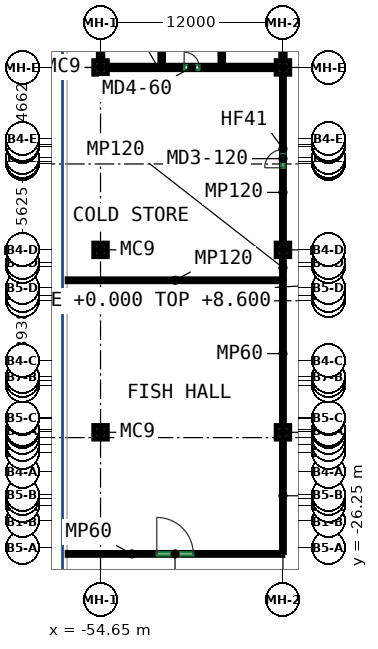
"""IFC4 building model, lengths in metres.
Left out: names, types, materials, properties, quantities, classifications, styles, units other than length and angle.
Written with IfcOpenShell. Run it as: python <this file> out.ifc"""

import sys

from ifc_helpers import new_model, si_unit, direction, frame, frame_2d, origin, origin_2d, place, context, subcontext, project, spatial, rectangle, extrude, source, transform, mapped, element, fill, save


model = new_model("IFC4")
c1 = context("Model", 3, precision=1e-05, world=origin(), true_north=direction((0.0, 1.0)))
c2 = subcontext(c1, "Body", "Model", "MODEL_VIEW")
j1 = project(units=[si_unit("LENGTHUNIT", "METRE"), si_unit("PLANEANGLEUNIT", "RADIAN")], contexts=[c1])
p1 = place(None, origin())
s1 = spatial("IfcSite", under=j1, at=p1, CompositionType="ELEMENT")
p2 = place(p1, origin())
s2 = spatial("IfcBuilding", under=s1, at=p2, CompositionType="ELEMENT")
p3 = place(p2, origin())
s3 = spatial("IfcBuildingStorey", under=s2, at=p3, CompositionType="ELEMENT", Elevation=0.0)
m1 = source(origin(), c2, "Body", "SweptSolid", [
    extrude(rectangle(XDim=0.9, YDim=0.9, at=origin_2d()), origin(), (0.0, 0.0, 1.0), 8.6),
])
for number, where, z_axis, x_axis in (
    (1, (-54.65, -18.65, 0.0), (0.0, 0.0, 1.0), (1.0, 0.0, 0.0)),
    (2, (-54.65, -6.65, 0.0), (0.0, 0.0, 1.0), (1.0, 0.0, 0.0)),
    (3, (-54.65, 5.35, 0.0), (0.0, 0.0, 1.0), (1.0, 0.0, 0.0)),
    (4, (-42.65, -18.65, 0.0), (0.0, 0.0, 1.0), (1.0, 0.0, 0.0)),
    (5, (-42.65, -6.65, 0.0), (0.0, 0.0, 1.0), (1.0, 0.0, 0.0)),
    (6, (-42.65, 5.35, 0.0), (0.0, 0.0, 1.0), (1.0, 0.0, 0.0)),
):
    element("IfcColumn", number, at=place(p3, frame(where, z_axis=z_axis, x_axis=x_axis)), inside=s3, PredefinedType="COLUMN", context=c2, shape_type="MappedRepresentation", body=[
        mapped(m1, transform((0.0, 0.0, 0.0))),
    ])
m2 = source(origin(), c2, "Body", "SweptSolid", [
    extrude(rectangle(XDim=11.1, YDim=0.3, at=frame_2d((5.55, 0.0))), origin(), (0.0, 0.0, 1.0), 7.7),
])
p4 = place(p3, frame((-54.2, 5.35, 0.0), z_axis=(0.0, 0.0, 1.0), x_axis=(1.0, 0.0, 0.0)))
e7 = element("IfcWall", 7, at=p4, inside=s3, PredefinedType="SHEAR", context=c2, shape_type="MappedRepresentation", body=[
    mapped(m2, transform((0.0, 0.0, 0.0))),
])
p5 = place(p4, frame((5.05, 0.0, 0.0)))
e8 = element("IfcOpeningElement", 8, at=p5, cuts=e7, PredefinedType="OPENING", context=c2, shape_type="SweptSolid", body=[
    extrude(rectangle(XDim=1.0, YDim=2.1, at=frame_2d((0.5, 1.05))), frame((0.0, 0.16, 0.0), z_axis=(0.0, -1.0, 0.0), x_axis=(1.0, 0.0, 0.0)), (0.0, 0.0, 1.0), 0.32),
])
for number, where, z_axis, x_axis in (
    (9, (-54.65, 5.8, 0.0), (0.0, 0.0, 1.0), (0.0, 1.0, 0.0)),
    (10, (-42.65, 5.8, 0.0), (0.0, 0.0, 1.0), (0.0, 1.0, 0.0)),
):
    element("IfcWall", number, at=place(p3, frame(where, z_axis=z_axis, x_axis=x_axis)), inside=s3, PredefinedType="SHEAR", context=c2, shape_type="MappedRepresentation", body=[
        mapped(m2, transform((0.0, 0.0, 0.0))),
    ])
m3 = source(origin(), c2, "Body", "SweptSolid", [
    extrude(rectangle(XDim=9.85, YDim=0.25, at=frame_2d((4.925, 0.0))), origin(), (0.0, 0.0, 1.0), 8.6),
])
for number, where, z_axis, x_axis in (
    (11, (-50.625, 5.5, 0.0), (0.0, 0.0, 1.0), (0.0, 1.0, 0.0)),
    (12, (-46.675, 5.5, 0.0), (0.0, 0.0, 1.0), (0.0, 1.0, 0.0)),
):
    element("IfcWall", number, at=place(p3, frame(where, z_axis=z_axis, x_axis=x_axis)), inside=s3, PredefinedType="SHEAR", context=c2, shape_type="MappedRepresentation", body=[
        mapped(m3, transform((0.0, 0.0, 0.0))),
    ])
m4 = source(origin(), c2, "Body", "SweptSolid", [
    extrude(rectangle(XDim=100.7, YDim=0.3, at=frame_2d((50.35, 0.0))), origin(), (0.0, 0.0, 1.0), 8.6),
])
p6 = place(p3, frame((-57.0, -43.55, 0.0), z_axis=(0.0, 0.0, 1.0), x_axis=(0.0, 1.0, 0.0)))
e13 = element("IfcWall", 13, at=p6, inside=s3, PredefinedType="SOLIDWALL", context=c2, shape_type="MappedRepresentation", body=[
    mapped(m4, transform((0.0, 0.0, 0.0))),
])
p7 = place(p6, frame((9.15, 0.0, 0.0)))
e14 = element("IfcOpeningElement", 14, at=p7, cuts=e13, PredefinedType="OPENING", context=c2, shape_type="SweptSolid", body=[
    extrude(rectangle(XDim=1.5, YDim=2.4, at=frame_2d((0.75, 1.2))), frame((0.0, 0.16, 0.0), z_axis=(0.0, -1.0, 0.0), x_axis=(1.0, 0.0, 0.0)), (0.0, 0.0, 1.0), 0.32),
])
p8 = place(p6, frame((29.25, 0.0, 0.0)))
e15 = element("IfcOpeningElement", 15, at=p8, cuts=e13, PredefinedType="OPENING", context=c2, shape_type="SweptSolid", body=[
    extrude(rectangle(XDim=1.5, YDim=2.4, at=frame_2d((0.75, 1.2))), frame((0.0, 0.16, 0.0), z_axis=(0.0, -1.0, 0.0), x_axis=(1.0, 0.0, 0.0)), (0.0, 0.0, 1.0), 0.32),
])
p9 = place(p6, frame((49.45, 0.0, 0.0)))
e16 = element("IfcOpeningElement", 16, at=p9, cuts=e13, PredefinedType="OPENING", context=c2, shape_type="SweptSolid", body=[
    extrude(rectangle(XDim=1.5, YDim=2.4, at=frame_2d((0.75, 1.2))), frame((0.0, 0.16, 0.0), z_axis=(0.0, -1.0, 0.0), x_axis=(1.0, 0.0, 0.0)), (0.0, 0.0, 1.0), 0.32),
])
p10 = place(p6, frame((69.65, 0.0, 0.0)))
e17 = element("IfcOpeningElement", 17, at=p10, cuts=e13, PredefinedType="OPENING", context=c2, shape_type="SweptSolid", body=[
    extrude(rectangle(XDim=1.5, YDim=2.4, at=frame_2d((0.75, 1.2))), frame((0.0, 0.16, 0.0), z_axis=(0.0, -1.0, 0.0), x_axis=(1.0, 0.0, 0.0)), (0.0, 0.0, 1.0), 0.32),
])
p11 = place(p6, frame((89.85, 0.0, 0.0)))
e18 = element("IfcOpeningElement", 18, at=p11, cuts=e13, PredefinedType="OPENING", context=c2, shape_type="SweptSolid", body=[
    extrude(rectangle(XDim=1.5, YDim=2.4, at=frame_2d((0.75, 1.2))), frame((0.0, 0.16, 0.0), z_axis=(0.0, -1.0, 0.0), x_axis=(1.0, 0.0, 0.0)), (0.0, 0.0, 1.0), 0.32),
])
p12 = place(p6, frame((3.15, 0.0, 0.6)))
e19 = element("IfcOpeningElement", 19, at=p12, cuts=e13, PredefinedType="OPENING", context=c2, shape_type="SweptSolid", body=[
    extrude(rectangle(XDim=2.4, YDim=3.0, at=frame_2d((1.2, 1.5))), frame((0.0, 0.16, 0.0), z_axis=(0.0, -1.0, 0.0), x_axis=(1.0, 0.0, 0.0)), (0.0, 0.0, 1.0), 0.32),
])
p13 = place(p6, frame((3.15, 0.0, 5.0)))
e20 = element("IfcOpeningElement", 20, at=p13, cuts=e13, PredefinedType="OPENING", context=c2, shape_type="SweptSolid", body=[
    extrude(rectangle(XDim=2.4, YDim=2.0, at=frame_2d((1.2, 1.0))), frame((0.0, 0.16, 0.0), z_axis=(0.0, -1.0, 0.0), x_axis=(1.0, 0.0, 0.0)), (0.0, 0.0, 1.0), 0.32),
])
p14 = place(p6, frame((19.15, 0.0, 0.6)))
e21 = element("IfcOpeningElement", 21, at=p14, cuts=e13, PredefinedType="OPENING", context=c2, shape_type="SweptSolid", body=[
    extrude(rectangle(XDim=2.4, YDim=3.0, at=frame_2d((1.2, 1.5))), frame((0.0, 0.16, 0.0), z_axis=(0.0, -1.0, 0.0), x_axis=(1.0, 0.0, 0.0)), (0.0, 0.0, 1.0), 0.32),
])
p15 = place(p6, frame((19.15, 0.0, 5.0)))
e22 = element("IfcOpeningElement", 22, at=p15, cuts=e13, PredefinedType="OPENING", context=c2, shape_type="SweptSolid", body=[
    extrude(rectangle(XDim=2.4, YDim=2.0, at=frame_2d((1.2, 1.0))), frame((0.0, 0.16, 0.0), z_axis=(0.0, -1.0, 0.0), x_axis=(1.0, 0.0, 0.0)), (0.0, 0.0, 1.0), 0.32),
])
p16 = place(p6, frame((23.15, 0.0, 0.6)))
e23 = element("IfcOpeningElement", 23, at=p16, cuts=e13, PredefinedType="OPENING", context=c2, shape_type="SweptSolid", body=[
    extrude(rectangle(XDim=2.4, YDim=3.0, at=frame_2d((1.2, 1.5))), frame((0.0, 0.16, 0.0), z_axis=(0.0, -1.0, 0.0), x_axis=(1.0, 0.0, 0.0)), (0.0, 0.0, 1.0), 0.32),
])
p17 = place(p6, frame((23.15, 0.0, 5.0)))
e24 = element("IfcOpeningElement", 24, at=p17, cuts=e13, PredefinedType="OPENING", context=c2, shape_type="SweptSolid", body=[
    extrude(rectangle(XDim=2.4, YDim=2.0, at=frame_2d((1.2, 1.0))), frame((0.0, 0.16, 0.0), z_axis=(0.0, -1.0, 0.0), x_axis=(1.0, 0.0, 0.0)), (0.0, 0.0, 1.0), 0.32),
])
p18 = place(p6, frame((39.15, 0.0, 0.6)))
e25 = element("IfcOpeningElement", 25, at=p18, cuts=e13, PredefinedType="OPENING", context=c2, shape_type="SweptSolid", body=[
    extrude(rectangle(XDim=2.4, YDim=3.0, at=frame_2d((1.2, 1.5))), frame((0.0, 0.16, 0.0), z_axis=(0.0, -1.0, 0.0), x_axis=(1.0, 0.0, 0.0)), (0.0, 0.0, 1.0), 0.32),
])
p19 = place(p6, frame((39.15, 0.0, 5.0)))
e26 = element("IfcOpeningElement", 26, at=p19, cuts=e13, PredefinedType="OPENING", context=c2, shape_type="SweptSolid", body=[
    extrude(rectangle(XDim=2.4, YDim=2.0, at=frame_2d((1.2, 1.0))), frame((0.0, 0.16, 0.0), z_axis=(0.0, -1.0, 0.0), x_axis=(1.0, 0.0, 0.0)), (0.0, 0.0, 1.0), 0.32),
])
p20 = place(p6, frame((43.15, 0.0, 0.6)))
e27 = element("IfcOpeningElement", 27, at=p20, cuts=e13, PredefinedType="OPENING", context=c2, shape_type="SweptSolid", body=[
    extrude(rectangle(XDim=2.4, YDim=3.0, at=frame_2d((1.2, 1.5))), frame((0.0, 0.16, 0.0), z_axis=(0.0, -1.0, 0.0), x_axis=(1.0, 0.0, 0.0)), (0.0, 0.0, 1.0), 0.32),
])
p21 = place(p6, frame((43.15, 0.0, 5.0)))
e28 = element("IfcOpeningElement", 28, at=p21, cuts=e13, PredefinedType="OPENING", context=c2, shape_type="SweptSolid", body=[
    extrude(rectangle(XDim=2.4, YDim=2.0, at=frame_2d((1.2, 1.0))), frame((0.0, 0.16, 0.0), z_axis=(0.0, -1.0, 0.0), x_axis=(1.0, 0.0, 0.0)), (0.0, 0.0, 1.0), 0.32),
])
p22 = place(p6, frame((55.15, 0.0, 0.6)))
e29 = element("IfcOpeningElement", 29, at=p22, cuts=e13, PredefinedType="OPENING", context=c2, shape_type="SweptSolid", body=[
    extrude(rectangle(XDim=2.4, YDim=3.0, at=frame_2d((1.2, 1.5))), frame((0.0, 0.16, 0.0), z_axis=(0.0, -1.0, 0.0), x_axis=(1.0, 0.0, 0.0)), (0.0, 0.0, 1.0), 0.32),
])
p23 = place(p6, frame((55.15, 0.0, 5.0)))
e30 = element("IfcOpeningElement", 30, at=p23, cuts=e13, PredefinedType="OPENING", context=c2, shape_type="SweptSolid", body=[
    extrude(rectangle(XDim=2.4, YDim=2.0, at=frame_2d((1.2, 1.0))), frame((0.0, 0.16, 0.0), z_axis=(0.0, -1.0, 0.0), x_axis=(1.0, 0.0, 0.0)), (0.0, 0.0, 1.0), 0.32),
])
p24 = place(p6, frame((59.15, 0.0, 0.6)))
e31 = element("IfcOpeningElement", 31, at=p24, cuts=e13, PredefinedType="OPENING", context=c2, shape_type="SweptSolid", body=[
    extrude(rectangle(XDim=2.4, YDim=3.0, at=frame_2d((1.2, 1.5))), frame((0.0, 0.16, 0.0), z_axis=(0.0, -1.0, 0.0), x_axis=(1.0, 0.0, 0.0)), (0.0, 0.0, 1.0), 0.32),
])
p25 = place(p6, frame((59.15, 0.0, 5.0)))
e32 = element("IfcOpeningElement", 32, at=p25, cuts=e13, PredefinedType="OPENING", context=c2, shape_type="SweptSolid", body=[
    extrude(rectangle(XDim=2.4, YDim=2.0, at=frame_2d((1.2, 1.0))), frame((0.0, 0.16, 0.0), z_axis=(0.0, -1.0, 0.0), x_axis=(1.0, 0.0, 0.0)), (0.0, 0.0, 1.0), 0.32),
])
p26 = place(p6, frame((63.15, 0.0, 0.6)))
e33 = element("IfcOpeningElement", 33, at=p26, cuts=e13, PredefinedType="OPENING", context=c2, shape_type="SweptSolid", body=[
    extrude(rectangle(XDim=2.4, YDim=3.0, at=frame_2d((1.2, 1.5))), frame((0.0, 0.16, 0.0), z_axis=(0.0, -1.0, 0.0), x_axis=(1.0, 0.0, 0.0)), (0.0, 0.0, 1.0), 0.32),
])
p27 = place(p6, frame((63.15, 0.0, 5.0)))
e34 = element("IfcOpeningElement", 34, at=p27, cuts=e13, PredefinedType="OPENING", context=c2, shape_type="SweptSolid", body=[
    extrude(rectangle(XDim=2.4, YDim=2.0, at=frame_2d((1.2, 1.0))), frame((0.0, 0.16, 0.0), z_axis=(0.0, -1.0, 0.0), x_axis=(1.0, 0.0, 0.0)), (0.0, 0.0, 1.0), 0.32),
])
p28 = place(p6, frame((75.15, 0.0, 0.6)))
e35 = element("IfcOpeningElement", 35, at=p28, cuts=e13, PredefinedType="OPENING", context=c2, shape_type="SweptSolid", body=[
    extrude(rectangle(XDim=2.4, YDim=3.0, at=frame_2d((1.2, 1.5))), frame((0.0, 0.16, 0.0), z_axis=(0.0, -1.0, 0.0), x_axis=(1.0, 0.0, 0.0)), (0.0, 0.0, 1.0), 0.32),
])
p29 = place(p6, frame((75.15, 0.0, 5.0)))
e36 = element("IfcOpeningElement", 36, at=p29, cuts=e13, PredefinedType="OPENING", context=c2, shape_type="SweptSolid", body=[
    extrude(rectangle(XDim=2.4, YDim=2.0, at=frame_2d((1.2, 1.0))), frame((0.0, 0.16, 0.0), z_axis=(0.0, -1.0, 0.0), x_axis=(1.0, 0.0, 0.0)), (0.0, 0.0, 1.0), 0.32),
])
p30 = place(p6, frame((79.15, 0.0, 0.6)))
e37 = element("IfcOpeningElement", 37, at=p30, cuts=e13, PredefinedType="OPENING", context=c2, shape_type="SweptSolid", body=[
    extrude(rectangle(XDim=2.4, YDim=3.0, at=frame_2d((1.2, 1.5))), frame((0.0, 0.16, 0.0), z_axis=(0.0, -1.0, 0.0), x_axis=(1.0, 0.0, 0.0)), (0.0, 0.0, 1.0), 0.32),
])
p31 = place(p6, frame((79.15, 0.0, 5.0)))
e38 = element("IfcOpeningElement", 38, at=p31, cuts=e13, PredefinedType="OPENING", context=c2, shape_type="SweptSolid", body=[
    extrude(rectangle(XDim=2.4, YDim=2.0, at=frame_2d((1.2, 1.0))), frame((0.0, 0.16, 0.0), z_axis=(0.0, -1.0, 0.0), x_axis=(1.0, 0.0, 0.0)), (0.0, 0.0, 1.0), 0.32),
])
p32 = place(p6, frame((83.15, 0.0, 0.6)))
e39 = element("IfcOpeningElement", 39, at=p32, cuts=e13, PredefinedType="OPENING", context=c2, shape_type="SweptSolid", body=[
    extrude(rectangle(XDim=2.4, YDim=3.0, at=frame_2d((1.2, 1.5))), frame((0.0, 0.16, 0.0), z_axis=(0.0, -1.0, 0.0), x_axis=(1.0, 0.0, 0.0)), (0.0, 0.0, 1.0), 0.32),
])
p33 = place(p6, frame((83.15, 0.0, 5.0)))
e40 = element("IfcOpeningElement", 40, at=p33, cuts=e13, PredefinedType="OPENING", context=c2, shape_type="SweptSolid", body=[
    extrude(rectangle(XDim=2.4, YDim=2.0, at=frame_2d((1.2, 1.0))), frame((0.0, 0.16, 0.0), z_axis=(0.0, -1.0, 0.0), x_axis=(1.0, 0.0, 0.0)), (0.0, 0.0, 1.0), 0.32),
])
p34 = place(p6, frame((95.15, 0.0, 0.6)))
e41 = element("IfcOpeningElement", 41, at=p34, cuts=e13, PredefinedType="OPENING", context=c2, shape_type="SweptSolid", body=[
    extrude(rectangle(XDim=2.4, YDim=3.0, at=frame_2d((1.2, 1.5))), frame((0.0, 0.16, 0.0), z_axis=(0.0, -1.0, 0.0), x_axis=(1.0, 0.0, 0.0)), (0.0, 0.0, 1.0), 0.32),
])
p35 = place(p6, frame((95.15, 0.0, 5.0)))
e42 = element("IfcOpeningElement", 42, at=p35, cuts=e13, PredefinedType="OPENING", context=c2, shape_type="SweptSolid", body=[
    extrude(rectangle(XDim=2.4, YDim=2.0, at=frame_2d((1.2, 1.0))), frame((0.0, 0.16, 0.0), z_axis=(0.0, -1.0, 0.0), x_axis=(1.0, 0.0, 0.0)), (0.0, 0.0, 1.0), 0.32),
])
m5 = source(origin(), c2, "Body", "SweptSolid", [
    extrude(rectangle(XDim=14.2, YDim=0.2, at=frame_2d((7.1, 0.0))), origin(), (0.0, 0.0, 1.0), 7.7),
])
p36 = place(p3, frame((-56.85, -26.65, 0.0), z_axis=(0.0, 0.0, 1.0), x_axis=(1.0, 0.0, 0.0)))
e43 = element("IfcWall", 43, at=p36, inside=s3, PredefinedType="PARTITIONING", context=c2, shape_type="MappedRepresentation", body=[
    mapped(m5, transform((0.0, 0.0, 0.0))),
])
p37 = place(p36, frame((5.9, 0.0, 0.0)))
e44 = element("IfcOpeningElement", 44, at=p37, cuts=e43, PredefinedType="OPENING", context=c2, shape_type="SweptSolid", body=[
    extrude(rectangle(XDim=2.4, YDim=2.4, at=frame_2d((1.2, 1.2))), frame((0.0, 0.11, 0.0), z_axis=(0.0, -1.0, 0.0), x_axis=(1.0, 0.0, 0.0)), (0.0, 0.0, 1.0), 0.22),
])
p38 = place(p3, frame((-56.85, -8.65, 0.0), z_axis=(0.0, 0.0, 1.0), x_axis=(1.0, 0.0, 0.0)))
e45 = element("IfcWall", 45, at=p38, inside=s3, PredefinedType="PARTITIONING", context=c2, shape_type="MappedRepresentation", body=[
    mapped(m5, transform((0.0, 0.0, 0.0))),
])
m6 = source(origin(), c2, "Body", "SweptSolid", [
    extrude(rectangle(XDim=1.75, YDim=0.2, at=frame_2d((0.875, 0.0))), origin(), (0.0, 0.0, 1.0), 8.6),
])
p39 = place(p3, frame((-56.85, 5.35, 0.0), z_axis=(0.0, 0.0, 1.0), x_axis=(1.0, 0.0, 0.0)))
e46 = element("IfcWall", 46, at=p39, inside=s3, PredefinedType="PARTITIONING", context=c2, shape_type="MappedRepresentation", body=[
    mapped(m6, transform((0.0, 0.0, 0.0))),
])
m7 = source(origin(), c2, "Body", "SweptSolid", [
    extrude(rectangle(XDim=7.45, YDim=0.2, at=frame_2d((3.725, 0.0))), origin(), (0.0, 0.0, 1.0), 7.7),
])
p40 = place(p3, frame((-42.65, -26.55, 0.0), z_axis=(0.0, 0.0, 1.0), x_axis=(0.0, 1.0, 0.0)))
e47 = element("IfcWall", 47, at=p40, inside=s3, PredefinedType="PARTITIONING", context=c2, shape_type="MappedRepresentation", body=[
    mapped(m7, transform((0.0, 0.0, 0.0))),
])
m8 = source(origin(), c2, "Body", "SweptSolid", [
    extrude(rectangle(XDim=9.45, YDim=0.2, at=frame_2d((4.725, 0.0))), origin(), (0.0, 0.0, 1.0), 7.7),
])
p41 = place(p3, frame((-42.65, -18.2, 0.0), z_axis=(0.0, 0.0, 1.0), x_axis=(0.0, 1.0, 0.0)))
e48 = element("IfcWall", 48, at=p41, inside=s3, PredefinedType="PARTITIONING", context=c2, shape_type="MappedRepresentation", body=[
    mapped(m8, transform((0.0, 0.0, 0.0))),
])
m9 = source(origin(), c2, "Body", "SweptSolid", [
    extrude(rectangle(XDim=1.45, YDim=0.2, at=frame_2d((0.725, 0.0))), origin(), (0.0, 0.0, 1.0), 7.7),
])
p42 = place(p3, frame((-42.65, -8.55, 0.0), z_axis=(0.0, 0.0, 1.0), x_axis=(0.0, 1.0, 0.0)))
e49 = element("IfcWall", 49, at=p42, inside=s3, PredefinedType="PARTITIONING", context=c2, shape_type="MappedRepresentation", body=[
    mapped(m9, transform((0.0, 0.0, 0.0))),
])
m10 = source(origin(), c2, "Body", "SweptSolid", [
    extrude(rectangle(XDim=11.1, YDim=0.2, at=frame_2d((5.55, 0.0))), origin(), (0.0, 0.0, 1.0), 7.7),
])
p43 = place(p3, frame((-42.65, -6.2, 0.0), z_axis=(0.0, 0.0, 1.0), x_axis=(0.0, 1.0, 0.0)))
e50 = element("IfcWall", 50, at=p43, inside=s3, PredefinedType="PARTITIONING", context=c2, shape_type="MappedRepresentation", body=[
    mapped(m10, transform((0.0, 0.0, 0.0))),
])
p44 = place(p43, frame((4.95, 0.0, 0.0)))
e51 = element("IfcOpeningElement", 51, at=p44, cuts=e50, PredefinedType="OPENING", context=c2, shape_type="SweptSolid", body=[
    extrude(rectangle(XDim=1.2, YDim=2.1, at=frame_2d((0.6, 1.05))), frame((0.0, 0.11, 0.0), z_axis=(0.0, -1.0, 0.0), x_axis=(1.0, 0.0, 0.0)), (0.0, 0.0, 1.0), 0.22),
])
p45 = place(p8, origin())
e52 = element("IfcDoor", 52, at=p45, inside=s3, OperationType="DOUBLE_DOOR_SINGLE_SWING", PredefinedType="DOOR", context=c2, shape_type="SweptSolid", body=[
    extrude(rectangle(XDim=1.5, YDim=2.4, at=frame_2d((0.75, 1.2))), frame((0.0, 0.025, 0.0), z_axis=(0.0, -1.0, 0.0), x_axis=(1.0, 0.0, 0.0)), (0.0, 0.0, 1.0), 0.05),
])
fill(e15, e52)
p46 = place(p9, origin())
e53 = element("IfcDoor", 53, at=p46, inside=s3, OperationType="DOUBLE_DOOR_SINGLE_SWING", PredefinedType="DOOR", context=c2, shape_type="SweptSolid", body=[
    extrude(rectangle(XDim=1.5, YDim=2.4, at=frame_2d((0.75, 1.2))), frame((0.0, 0.025, 0.0), z_axis=(0.0, -1.0, 0.0), x_axis=(1.0, 0.0, 0.0)), (0.0, 0.0, 1.0), 0.05),
])
fill(e16, e53)
p47 = place(p14, origin())
e54 = element("IfcWindow", 54, at=p47, inside=s3, PartitioningType="SINGLE_PANEL", PredefinedType="WINDOW", context=c2, shape_type="SweptSolid", body=[
    extrude(rectangle(XDim=2.4, YDim=3.0, at=frame_2d((1.2, 1.5))), frame((0.0, 0.03, 0.0), z_axis=(0.0, -1.0, 0.0), x_axis=(1.0, 0.0, 0.0)), (0.0, 0.0, 1.0), 0.06),
])
fill(e21, e54)
p48 = place(p15, origin())
e55 = element("IfcWindow", 55, at=p48, inside=s3, PartitioningType="SINGLE_PANEL", PredefinedType="WINDOW", context=c2, shape_type="SweptSolid", body=[
    extrude(rectangle(XDim=2.4, YDim=2.0, at=frame_2d((1.2, 1.0))), frame((0.0, 0.03, 0.0), z_axis=(0.0, -1.0, 0.0), x_axis=(1.0, 0.0, 0.0)), (0.0, 0.0, 1.0), 0.06),
])
fill(e22, e55)
p49 = place(p16, origin())
e56 = element("IfcWindow", 56, at=p49, inside=s3, PartitioningType="SINGLE_PANEL", PredefinedType="WINDOW", context=c2, shape_type="SweptSolid", body=[
    extrude(rectangle(XDim=2.4, YDim=3.0, at=frame_2d((1.2, 1.5))), frame((0.0, 0.03, 0.0), z_axis=(0.0, -1.0, 0.0), x_axis=(1.0, 0.0, 0.0)), (0.0, 0.0, 1.0), 0.06),
])
fill(e23, e56)
p50 = place(p17, origin())
e57 = element("IfcWindow", 57, at=p50, inside=s3, PartitioningType="SINGLE_PANEL", PredefinedType="WINDOW", context=c2, shape_type="SweptSolid", body=[
    extrude(rectangle(XDim=2.4, YDim=2.0, at=frame_2d((1.2, 1.0))), frame((0.0, 0.03, 0.0), z_axis=(0.0, -1.0, 0.0), x_axis=(1.0, 0.0, 0.0)), (0.0, 0.0, 1.0), 0.06),
])
fill(e24, e57)
p51 = place(p18, origin())
e58 = element("IfcWindow", 58, at=p51, inside=s3, PartitioningType="SINGLE_PANEL", PredefinedType="WINDOW", context=c2, shape_type="SweptSolid", body=[
    extrude(rectangle(XDim=2.4, YDim=3.0, at=frame_2d((1.2, 1.5))), frame((0.0, 0.03, 0.0), z_axis=(0.0, -1.0, 0.0), x_axis=(1.0, 0.0, 0.0)), (0.0, 0.0, 1.0), 0.06),
])
fill(e25, e58)
p52 = place(p19, origin())
e59 = element("IfcWindow", 59, at=p52, inside=s3, PartitioningType="SINGLE_PANEL", PredefinedType="WINDOW", context=c2, shape_type="SweptSolid", body=[
    extrude(rectangle(XDim=2.4, YDim=2.0, at=frame_2d((1.2, 1.0))), frame((0.0, 0.03, 0.0), z_axis=(0.0, -1.0, 0.0), x_axis=(1.0, 0.0, 0.0)), (0.0, 0.0, 1.0), 0.06),
])
fill(e26, e59)
p53 = place(p20, origin())
e60 = element("IfcWindow", 60, at=p53, inside=s3, PartitioningType="SINGLE_PANEL", PredefinedType="WINDOW", context=c2, shape_type="SweptSolid", body=[
    extrude(rectangle(XDim=2.4, YDim=3.0, at=frame_2d((1.2, 1.5))), frame((0.0, 0.03, 0.0), z_axis=(0.0, -1.0, 0.0), x_axis=(1.0, 0.0, 0.0)), (0.0, 0.0, 1.0), 0.06),
])
fill(e27, e60)
p54 = place(p21, origin())
e61 = element("IfcWindow", 61, at=p54, inside=s3, PartitioningType="SINGLE_PANEL", PredefinedType="WINDOW", context=c2, shape_type="SweptSolid", body=[
    extrude(rectangle(XDim=2.4, YDim=2.0, at=frame_2d((1.2, 1.0))), frame((0.0, 0.03, 0.0), z_axis=(0.0, -1.0, 0.0), x_axis=(1.0, 0.0, 0.0)), (0.0, 0.0, 1.0), 0.06),
])
fill(e28, e61)
p55 = place(p5, origin())
e62 = element("IfcDoor", 62, at=p55, inside=s3, OperationType="SINGLE_SWING_LEFT", PredefinedType="DOOR", context=c2, shape_type="SweptSolid", body=[
    extrude(rectangle(XDim=1.0, YDim=2.1, at=frame_2d((0.5, 1.05))), frame((0.0, 0.025, 0.0), z_axis=(0.0, -1.0, 0.0), x_axis=(1.0, 0.0, 0.0)), (0.0, 0.0, 1.0), 0.05),
])
fill(e8, e62)
p56 = place(p37, origin())
e63 = element("IfcDoor", 63, at=p56, inside=s3, OperationType="DOUBLE_DOOR_SINGLE_SWING", PredefinedType="DOOR", context=c2, shape_type="SweptSolid", body=[
    extrude(rectangle(XDim=2.4, YDim=2.4, at=frame_2d((1.2, 1.2))), frame((0.0, 0.025, 0.0), z_axis=(0.0, -1.0, 0.0), x_axis=(1.0, 0.0, 0.0)), (0.0, 0.0, 1.0), 0.05),
])
fill(e44, e63)
p57 = place(p44, origin())
e64 = element("IfcDoor", 64, at=p57, inside=s3, OperationType="SINGLE_SWING_LEFT", PredefinedType="DOOR", context=c2, shape_type="SweptSolid", body=[
    extrude(rectangle(XDim=1.2, YDim=2.1, at=frame_2d((0.6, 1.05))), frame((0.0, 0.025, 0.0), z_axis=(0.0, -1.0, 0.0), x_axis=(1.0, 0.0, 0.0)), (0.0, 0.0, 1.0), 0.05),
])
fill(e51, e64)
save(model, sys.argv[1])
